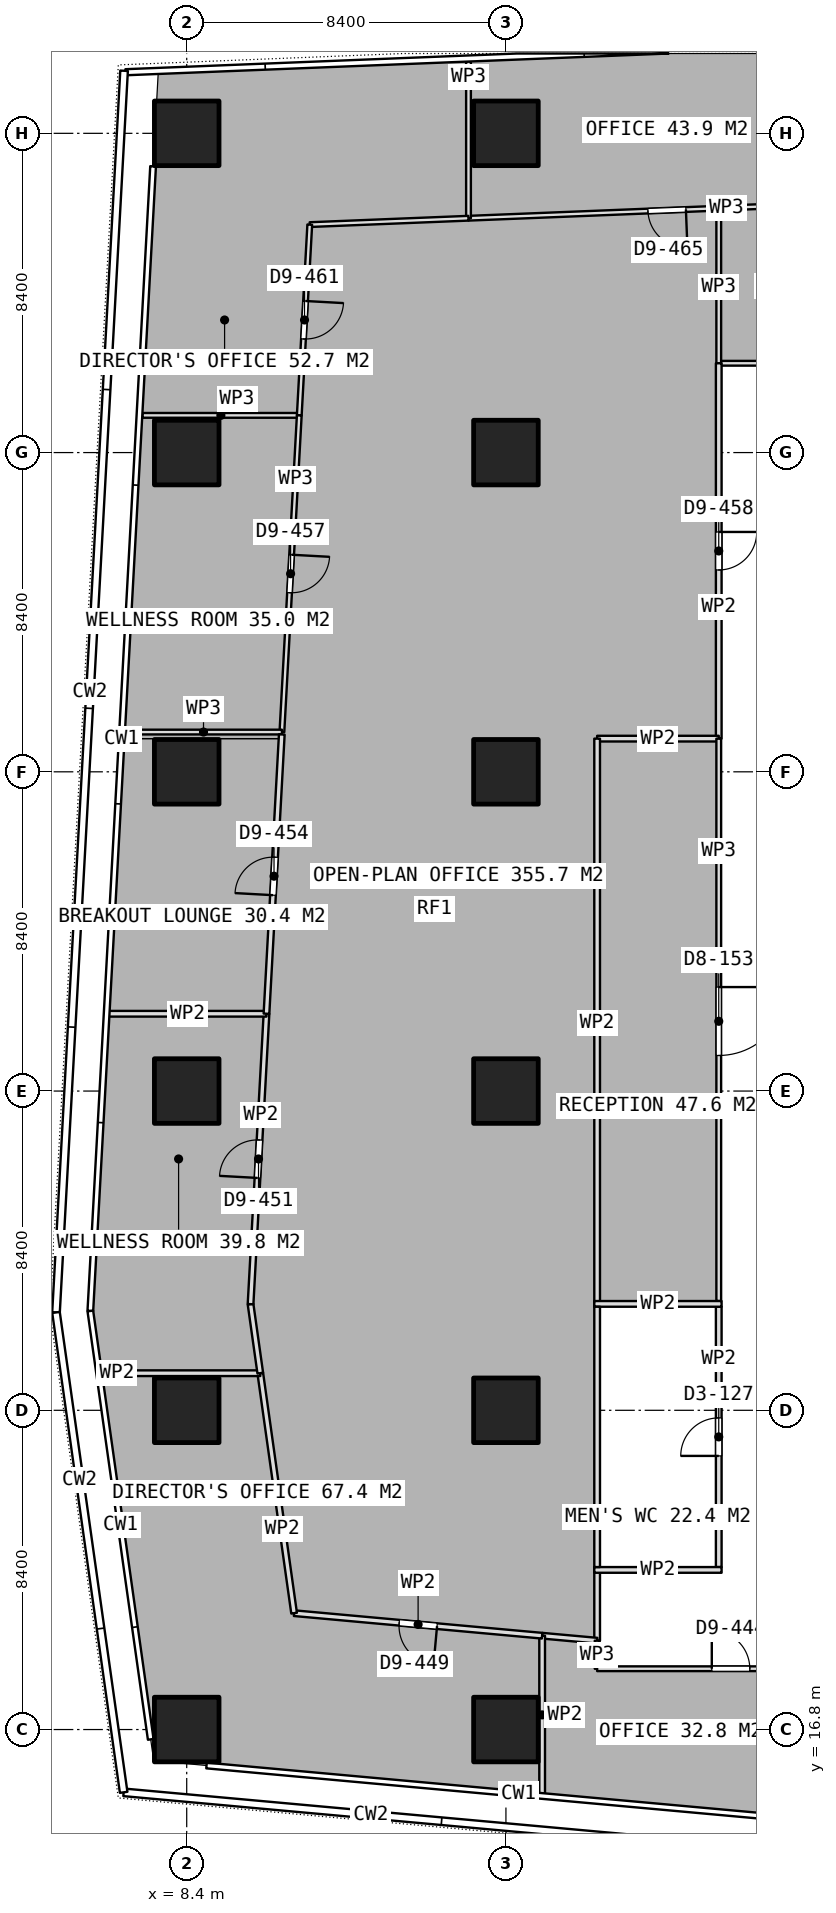
"""IFC4 building model, lengths in metres.
Left out: names, types, materials, properties, quantities, classifications, styles, units other than length and angle.
Written with IfcOpenShell. Run it as: python <this file> out.ifc"""

import sys

from ifc_helpers import new_model, si_unit, direction, frame, frame_2d, origin, origin_2d, place, context, subcontext, project, spatial, rectangle, extrude, element, fill, save


model = new_model("IFC4")
c1 = context("Model", 3, precision=1e-05, world=origin(), true_north=direction((0.0, 1.0)))
c2 = subcontext(c1, "Body", "Model", "MODEL_VIEW")
j1 = project(units=[si_unit("LENGTHUNIT", "METRE"), si_unit("PLANEANGLEUNIT", "RADIAN")], contexts=[c1])
p1 = place(None, origin())
s1 = spatial("IfcSite", under=j1, at=p1, CompositionType="ELEMENT")
p2 = place(p1, origin())
s2 = spatial("IfcBuilding", under=s1, at=p2, CompositionType="ELEMENT")
p3 = place(p2, frame((0.0, 0.0, 121.55)))
s3 = spatial("IfcBuildingStorey", under=s2, at=p3, CompositionType="ELEMENT", Elevation=121.55)
for number, where, z_axis, x_axis in (
    (1, (8.4, 16.8, 0.0), (0.0, 0.0, 1.0), (1.0, 0.0, 0.0)),
    (2, (8.4, 25.2, 0.0), (0.0, 0.0, 1.0), (1.0, 0.0, 0.0)),
    (3, (8.4, 33.6, 0.0), (0.0, 0.0, 1.0), (1.0, 0.0, 0.0)),
    (4, (8.4, 42.0, 0.0), (0.0, 0.0, 1.0), (1.0, 0.0, 0.0)),
    (5, (8.4, 50.4, 0.0), (0.0, 0.0, 1.0), (1.0, 0.0, 0.0)),
    (6, (8.4, 58.8, 0.0), (0.0, 0.0, 1.0), (1.0, 0.0, 0.0)),
    (7, (16.8, 16.8, 0.0), (0.0, 0.0, 1.0), (1.0, 0.0, 0.0)),
    (8, (16.8, 25.2, 0.0), (0.0, 0.0, 1.0), (1.0, 0.0, 0.0)),
    (9, (16.8, 33.6, 0.0), (0.0, 0.0, 1.0), (1.0, 0.0, 0.0)),
    (10, (16.8, 42.0, 0.0), (0.0, 0.0, 1.0), (1.0, 0.0, 0.0)),
    (11, (16.8, 50.4, 0.0), (0.0, 0.0, 1.0), (1.0, 0.0, 0.0)),
    (12, (16.8, 58.8, 0.0), (0.0, 0.0, 1.0), (1.0, 0.0, 0.0)),
):
    element("IfcColumn", number, at=place(p3, frame(where, z_axis=z_axis, x_axis=x_axis)), inside=s3, PredefinedType="COLUMN", context=c2, shape_type="SweptSolid", body=[
        extrude(rectangle(XDim=1.7, YDim=1.7, at=origin_2d()), origin(), (0.0, 0.0, 1.0), 3.75),
    ])
for number, where, z_axis, x_axis in (
    (13, (19.125, 21.0, 0.0), (0.0, 0.0, 1.0), (1.0, 0.0, 0.0)),
    (14, (19.125, 28.0, 0.0), (0.0, 0.0, 1.0), (1.0, 0.0, 0.0)),
):
    element("IfcWall", number, at=place(p3, frame(where, z_axis=z_axis, x_axis=x_axis)), inside=s3, PredefinedType="PARTITIONING", context=c2, shape_type="SweptSolid", body=[
        extrude(rectangle(XDim=3.35, YDim=0.15, at=frame_2d((1.675, 0.0))), origin(), (0.0, 0.0, 1.0), 3.5),
    ])
p4 = place(p3, frame((19.2, 21.075, 0.0), z_axis=(0.0, 0.0, 1.0), x_axis=(0.0, 1.0, 0.0)))
e15 = element("IfcWall", 15, at=p4, inside=s3, PredefinedType="PARTITIONING", context=c2, shape_type="SweptSolid", body=[
    extrude(rectangle(XDim=6.85, YDim=0.15, at=frame_2d((3.425, 0.0))), origin(), (0.0, 0.0, 1.0), 3.5),
])
p5 = place(p3, frame((22.4, 21.075, 0.0), z_axis=(0.0, 0.0, 1.0), x_axis=(0.0, 1.0, 0.0)))
e16 = element("IfcWall", 16, at=p5, inside=s3, PredefinedType="PARTITIONING", context=c2, shape_type="SweptSolid", body=[
    extrude(rectangle(XDim=6.85, YDim=0.15, at=frame_2d((3.425, 0.0))), origin(), (0.0, 0.0, 1.0), 3.5),
])
p6 = place(p5, frame((2.925, 0.0, 0.0)))
e17 = element("IfcOpeningElement", 17, at=p6, cuts=e16, PredefinedType="OPENING", context=c2, shape_type="SweptSolid", body=[
    extrude(rectangle(XDim=1.0, YDim=2.1, at=frame_2d((0.5, 1.05))), frame((0.0, 0.085, 0.0), z_axis=(0.0, -1.0, 0.0), x_axis=(1.0, 0.0, 0.0)), (0.0, 0.0, 1.0), 0.17),
])
p7 = place(p3, frame((26.257, 56.984, 0.0), z_axis=(0.0, 0.0, 1.0), x_axis=(-0.999199876108, -0.039995094524, 0.0)))
e18 = element("IfcWall", 18, at=p7, inside=s3, PredefinedType="PARTITIONING", context=c2, shape_type="SweptSolid", body=[
    extrude(rectangle(XDim=10.45, YDim=0.125, at=frame_2d((5.225, 0.0))), origin(), (0.0, 0.0, 1.0), 3.5),
])
p8 = place(p7, frame((4.725, 0.0, 0.0)))
e19 = element("IfcOpeningElement", 19, at=p8, cuts=e18, PredefinedType="OPENING", context=c2, shape_type="SweptSolid", body=[
    extrude(rectangle(XDim=1.0, YDim=2.1, at=frame_2d((0.5, 1.05))), frame((0.0, 0.073, 0.0), z_axis=(0.0, -1.0, 0.0), x_axis=(1.0, 0.0, 0.0)), (0.0, 0.0, 1.0), 0.145),
])
p9 = place(p3, frame((15.815, 56.566, 0.0), z_axis=(0.0, 0.0, 1.0), x_axis=(0.0, 1.0, 0.0)))
e20 = element("IfcWall", 20, at=p9, inside=s3, PredefinedType="PARTITIONING", context=c2, shape_type="SweptSolid", body=[
    extrude(rectangle(XDim=4.123, YDim=0.125, at=frame_2d((2.062, 0.0))), origin(), (0.0, 0.0, 1.0), 3.5),
])
p10 = place(p3, frame((11.362, 51.379, 0.0), z_axis=(0.0, 0.0, 1.0), x_axis=(-1.0, 0.0, 0.0)))
e21 = element("IfcWall", 21, at=p10, inside=s3, PredefinedType="PARTITIONING", context=c2, shape_type="SweptSolid", body=[
    extrude(rectangle(XDim=4.126, YDim=0.125, at=frame_2d((2.063, 0.0))), origin(), (0.0, 0.0, 1.0), 3.5),
])
p11 = place(p3, frame((15.814, 56.566, 0.0), z_axis=(0.0, 0.0, 1.0), x_axis=(-0.999192069217, -0.040189660545, 0.0)))
e22 = element("IfcWall", 22, at=p11, inside=s3, PredefinedType="PARTITIONING", context=c2, shape_type="SweptSolid", body=[
    extrude(rectangle(XDim=4.179, YDim=0.125, at=frame_2d((2.09, 0.0))), origin(), (0.0, 0.0, 1.0), 3.5),
])
p12 = place(p3, frame((11.638, 56.398, 0.0), z_axis=(0.0, 0.0, 1.0), x_axis=(-0.05488358881, -0.998492759953, 0.0)))
e23 = element("IfcWall", 23, at=p12, inside=s3, PredefinedType="PARTITIONING", context=c2, shape_type="SweptSolid", body=[
    extrude(rectangle(XDim=5.027, YDim=0.125, at=frame_2d((2.513, 0.0))), origin(), (0.0, 0.0, 1.0), 3.5),
])
p13 = place(p12, frame((2.013, 0.0, 0.0)))
e24 = element("IfcOpeningElement", 24, at=p13, cuts=e23, PredefinedType="OPENING", context=c2, shape_type="SweptSolid", body=[
    extrude(rectangle(XDim=1.0, YDim=2.1, at=frame_2d((0.5, 1.05))), frame((0.0, 0.073, 0.0), z_axis=(0.0, -1.0, 0.0), x_axis=(1.0, 0.0, 0.0)), (0.0, 0.0, 1.0), 0.145),
])
p14 = place(p3, frame((11.362, 51.378, 0.0), z_axis=(0.0, 0.0, 1.0), x_axis=(-0.054769987218, -0.998498997746, 0.0)))
e25 = element("IfcWall", 25, at=p14, inside=s3, PredefinedType="PARTITIONING", context=c2, shape_type="SweptSolid", body=[
    extrude(rectangle(XDim=8.344, YDim=0.125, at=frame_2d((4.172, 0.0))), origin(), (0.0, 0.0, 1.0), 3.5),
])
p15 = place(p14, frame((3.672, 0.0, 0.0)))
e26 = element("IfcOpeningElement", 26, at=p15, cuts=e25, PredefinedType="OPENING", context=c2, shape_type="SweptSolid", body=[
    extrude(rectangle(XDim=1.0, YDim=2.1, at=frame_2d((0.5, 1.05))), frame((0.0, 0.073, 0.0), z_axis=(0.0, -1.0, 0.0), x_axis=(1.0, 0.0, 0.0)), (0.0, 0.0, 1.0), 0.145),
])
p16 = place(p3, frame((10.905, 43.046, 0.0), z_axis=(0.0, 0.0, 1.0), x_axis=(-1.0, 0.0, 0.0)))
e27 = element("IfcWall", 27, at=p16, inside=s3, PredefinedType="PARTITIONING", context=c2, shape_type="SweptSolid", body=[
    extrude(rectangle(XDim=4.126, YDim=0.125, at=frame_2d((2.063, 0.0))), origin(), (0.0, 0.0, 1.0), 3.5),
])
p17 = place(p3, frame((29.6, 52.75, 0.0), z_axis=(0.0, 0.0, 1.0), x_axis=(-1.0, 0.0, 0.0)))
e28 = element("IfcWall", 28, at=p17, inside=s3, PredefinedType="PARTITIONING", context=c2, shape_type="SweptSolid", body=[
    extrude(rectangle(XDim=7.2, YDim=0.125, at=frame_2d((3.6, 0.0))), origin(), (0.0, 0.0, 1.0), 3.5),
])
p18 = place(p17, frame((3.1, 0.0, 0.0)))
e29 = element("IfcOpeningElement", 29, at=p18, cuts=e28, PredefinedType="OPENING", context=c2, shape_type="SweptSolid", body=[
    extrude(rectangle(XDim=1.0, YDim=2.1, at=frame_2d((0.5, 1.05))), frame((0.0, 0.073, 0.0), z_axis=(0.0, -1.0, 0.0), x_axis=(1.0, 0.0, 0.0)), (0.0, 0.0, 1.0), 0.145),
])
p19 = place(p3, frame((22.4, 52.75, 0.0), z_axis=(0.0, 0.0, 1.0), x_axis=(0.0, 1.0, 0.0)))
e30 = element("IfcWall", 30, at=p19, inside=s3, PredefinedType="PARTITIONING", context=c2, shape_type="SweptSolid", body=[
    extrude(rectangle(XDim=4.017, YDim=0.125, at=frame_2d((2.009, 0.0))), origin(), (0.0, 0.0, 1.0), 3.5),
])
p20 = place(p3, frame((22.4, 52.75, 0.0), z_axis=(0.0, 0.0, 1.0), x_axis=(0.0, -1.0, 0.0)))
e31 = element("IfcWall", 31, at=p20, inside=s3, PredefinedType="PARTITIONING", context=c2, shape_type="SweptSolid", body=[
    extrude(rectangle(XDim=9.877, YDim=0.15, at=frame_2d((4.938, 0.0))), origin(), (0.0, 0.0, 1.0), 3.5),
])
p21 = place(p20, frame((4.439, 0.0, 0.0)))
e32 = element("IfcOpeningElement", 32, at=p21, cuts=e31, PredefinedType="OPENING", context=c2, shape_type="SweptSolid", body=[
    extrude(rectangle(XDim=1.0, YDim=2.1, at=frame_2d((0.5, 1.05))), frame((0.0, 0.085, 0.0), z_axis=(0.0, -1.0, 0.0), x_axis=(1.0, 0.0, 0.0)), (0.0, 0.0, 1.0), 0.17),
])
p22 = place(p3, frame((22.4, 42.873, 0.0), z_axis=(0.0, 0.0, 1.0), x_axis=(-1.0, 0.0, 0.0)))
e33 = element("IfcWall", 33, at=p22, inside=s3, PredefinedType="PARTITIONING", context=c2, shape_type="SweptSolid", body=[
    extrude(rectangle(XDim=3.2, YDim=0.15, at=frame_2d((1.6, 0.0))), origin(), (0.0, 0.0, 1.0), 3.5),
])
p23 = place(p3, frame((19.2, 42.873, 0.0), z_axis=(0.0, 0.0, 1.0), x_axis=(0.0, -1.0, 0.0)))
e34 = element("IfcWall", 34, at=p23, inside=s3, PredefinedType="PARTITIONING", context=c2, shape_type="SweptSolid", body=[
    extrude(rectangle(XDim=14.948, YDim=0.15, at=frame_2d((7.474, 0.0))), origin(), (0.0, 0.0, 1.0), 3.5),
])
p24 = place(p3, frame((19.2, 21.075, 0.0), z_axis=(0.0, 0.0, 1.0), x_axis=(0.0, -1.0, 0.0)))
e35 = element("IfcWall", 35, at=p24, inside=s3, PredefinedType="PARTITIONING", context=c2, shape_type="SweptSolid", body=[
    extrude(rectangle(XDim=1.937, YDim=0.15, at=frame_2d((0.969, 0.0))), origin(), (0.0, 0.0, 1.0), 3.5),
])
p25 = place(p3, frame((19.2, 19.138, 0.0), z_axis=(0.0, 0.0, 1.0), x_axis=(-0.995920706464, 0.090232734836, 0.0)))
e36 = element("IfcWall", 36, at=p25, inside=s3, PredefinedType="PARTITIONING", context=c2, shape_type="SweptSolid", body=[
    extrude(rectangle(XDim=1.453, YDim=0.15, at=frame_2d((0.727, 0.0))), origin(), (0.0, 0.0, 1.0), 3.5),
])
p26 = place(p3, frame((17.753, 19.269, 0.0), z_axis=(0.0, 0.0, 1.0), x_axis=(0.0, -1.0, 0.0)))
e37 = element("IfcWall", 37, at=p26, inside=s3, PredefinedType="PARTITIONING", context=c2, shape_type="SweptSolid", body=[
    extrude(rectangle(XDim=4.167, YDim=0.15, at=frame_2d((2.083, 0.0))), origin(), (0.0, 0.0, 1.0), 3.5),
])
p27 = place(p3, frame((17.752, 19.269, 0.0), z_axis=(0.0, 0.0, 1.0), x_axis=(-0.995896565077, 0.090498793736, 0.0)))
e38 = element("IfcWall", 38, at=p27, inside=s3, PredefinedType="PARTITIONING", context=c2, shape_type="SweptSolid", body=[
    extrude(rectangle(XDim=6.553, YDim=0.15, at=frame_2d((3.276, 0.0))), origin(), (0.0, 0.0, 1.0), 3.5),
])
p28 = place(p27, frame((2.776, 0.0, 0.0)))
e39 = element("IfcOpeningElement", 39, at=p28, cuts=e38, PredefinedType="OPENING", context=c2, shape_type="SweptSolid", body=[
    extrude(rectangle(XDim=1.0, YDim=2.1, at=frame_2d((0.5, 1.05))), frame((0.0, 0.085, 0.0), z_axis=(0.0, -1.0, 0.0), x_axis=(1.0, 0.0, 0.0)), (0.0, 0.0, 1.0), 0.17),
])
p29 = place(p3, frame((11.226, 19.862, 0.0), z_axis=(0.0, 0.0, 1.0), x_axis=(-0.13959860056, 0.990208175447, 0.0)))
e40 = element("IfcWall", 40, at=p29, inside=s3, PredefinedType="PARTITIONING", context=c2, shape_type="SweptSolid", body=[
    extrude(rectangle(XDim=6.376, YDim=0.15, at=frame_2d((3.188, 0.0))), origin(), (0.0, 0.0, 1.0), 3.5),
])
p30 = place(p3, frame((10.336, 26.176, 0.0), z_axis=(0.0, 0.0, 1.0), x_axis=(-1.0, 0.0, 0.0)))
e41 = element("IfcWall", 41, at=p30, inside=s3, PredefinedType="PARTITIONING", context=c2, shape_type="SweptSolid", body=[
    extrude(rectangle(XDim=4.191, YDim=0.15, at=frame_2d((2.095, 0.0))), origin(), (0.0, 0.0, 1.0), 3.5),
])
p31 = place(p3, frame((10.336, 26.177, 0.0), z_axis=(0.0, 0.0, 1.0), x_axis=(-0.139520002301, 0.990219252973, 0.0)))
e42 = element("IfcWall", 42, at=p31, inside=s3, PredefinedType="PARTITIONING", context=c2, shape_type="SweptSolid", body=[
    extrude(rectangle(XDim=1.834, YDim=0.15, at=frame_2d((0.917, 0.0))), origin(), (0.0, 0.0, 1.0), 3.5),
])
p32 = place(p3, frame((10.08, 27.993, 0.0), z_axis=(0.0, 0.0, 1.0), x_axis=(0.054745561338, 0.998500337263, 0.0)))
e43 = element("IfcWall", 43, at=p32, inside=s3, PredefinedType="PARTITIONING", context=c2, shape_type="SweptSolid", body=[
    extrude(rectangle(XDim=7.653, YDim=0.15, at=frame_2d((3.826, 0.0))), origin(), (0.0, 0.0, 1.0), 3.5),
])
p33 = place(p32, frame((3.326, 0.0, 0.0)))
e44 = element("IfcOpeningElement", 44, at=p33, cuts=e43, PredefinedType="OPENING", context=c2, shape_type="SweptSolid", body=[
    extrude(rectangle(XDim=1.0, YDim=2.1, at=frame_2d((0.5, 1.05))), frame((0.0, 0.085, 0.0), z_axis=(0.0, -1.0, 0.0), x_axis=(1.0, 0.0, 0.0)), (0.0, 0.0, 1.0), 0.17),
])
p34 = place(p3, frame((10.499, 35.634, 0.0), z_axis=(0.0, 0.0, 1.0), x_axis=(-1.0, 0.0, 0.0)))
e45 = element("IfcWall", 45, at=p34, inside=s3, PredefinedType="PARTITIONING", context=c2, shape_type="SweptSolid", body=[
    extrude(rectangle(XDim=4.156, YDim=0.15, at=frame_2d((2.078, 0.0))), origin(), (0.0, 0.0, 1.0), 3.5),
])
p35 = place(p3, frame((10.499, 35.635, 0.0), z_axis=(0.0, 0.0, 1.0), x_axis=(0.054773615864, 0.9984987987, 0.0)))
e46 = element("IfcWall", 46, at=p35, inside=s3, PredefinedType="PARTITIONING", context=c2, shape_type="SweptSolid", body=[
    extrude(rectangle(XDim=7.359, YDim=0.15, at=frame_2d((3.679, 0.0))), origin(), (0.0, 0.0, 1.0), 3.5),
])
p36 = place(p35, frame((3.124, 0.0, 0.0)))
e47 = element("IfcOpeningElement", 47, at=p36, cuts=e46, PredefinedType="OPENING", context=c2, shape_type="SweptSolid", body=[
    extrude(rectangle(XDim=1.0, YDim=2.1, at=frame_2d((0.5, 1.05))), frame((0.0, 0.085, 0.0), z_axis=(0.0, -1.0, 0.0), x_axis=(1.0, 0.0, 0.0)), (0.0, 0.0, 1.0), 0.17),
])
p37 = place(p3, frame((19.2, 19.138, 0.0), z_axis=(0.0, 0.0, 1.0), x_axis=(0.0, -1.0, 0.0)))
e48 = element("IfcWall", 48, at=p37, inside=s3, PredefinedType="PARTITIONING", context=c2, shape_type="SweptSolid", body=[
    extrude(rectangle(XDim=0.738, YDim=0.125, at=frame_2d((0.369, 0.0))), origin(), (0.0, 0.0, 1.0), 3.5),
])
p38 = place(p3, frame((19.2, 18.4, 0.0), z_axis=(0.0, 0.0, 1.0), x_axis=(1.0, 0.0, 0.0)))
e49 = element("IfcWall", 49, at=p38, inside=s3, PredefinedType="PARTITIONING", context=c2, shape_type="SweptSolid", body=[
    extrude(rectangle(XDim=7.034, YDim=0.125, at=frame_2d((3.517, 0.0))), origin(), (0.0, 0.0, 1.0), 3.5),
])
p39 = place(p38, frame((3.017, 0.0, 0.0)))
e50 = element("IfcOpeningElement", 50, at=p39, cuts=e49, PredefinedType="OPENING", context=c2, shape_type="SweptSolid", body=[
    extrude(rectangle(XDim=1.0, YDim=2.1, at=frame_2d((0.5, 1.05))), frame((0.0, 0.073, 0.0), z_axis=(0.0, -1.0, 0.0), x_axis=(1.0, 0.0, 0.0)), (0.0, 0.0, 1.0), 0.145),
])
p40 = place(p3, frame((22.4, 42.872, 0.0), z_axis=(0.0, 0.0, 1.0), x_axis=(0.0, -1.0, 0.0)))
e51 = element("IfcWall", 51, at=p40, inside=s3, PredefinedType="PARTITIONING", context=c2, shape_type="SweptSolid", body=[
    extrude(rectangle(XDim=14.797, YDim=0.125, at=frame_2d((7.398, 0.0))), origin(), (0.0, 0.0, 1.0), 3.5),
])
p41 = place(p40, frame((6.536, 0.0, 0.0)))
e52 = element("IfcOpeningElement", 52, at=p41, cuts=e51, PredefinedType="OPENING", context=c2, shape_type="SweptSolid", body=[
    extrude(rectangle(XDim=1.8, YDim=2.1, at=frame_2d((0.9, 1.05))), frame((0.0, 0.073, 0.0), z_axis=(0.0, -1.0, 0.0), x_axis=(1.0, 0.0, 0.0)), (0.0, 0.0, 1.0), 0.145),
])
p42 = place(p6, origin())
e53 = element("IfcDoor", 53, at=p42, inside=s3, OperationType="SINGLE_SWING_LEFT", PredefinedType="DOOR", context=c2, shape_type="SweptSolid", body=[
    extrude(rectangle(XDim=1.0, YDim=2.1, at=frame_2d((0.5, 1.05))), frame((0.0, 0.025, 0.0), z_axis=(0.0, -1.0, 0.0), x_axis=(1.0, 0.0, 0.0)), (0.0, 0.0, 1.0), 0.05),
])
fill(e17, e53)
p43 = place(p8, origin())
e54 = element("IfcDoor", 54, at=p43, inside=s3, OperationType="SINGLE_SWING_LEFT", PredefinedType="DOOR", context=c2, shape_type="SweptSolid", body=[
    extrude(rectangle(XDim=1.0, YDim=2.1, at=frame_2d((0.5, 1.05))), frame((0.0, 0.025, 0.0), z_axis=(0.0, -1.0, 0.0), x_axis=(1.0, 0.0, 0.0)), (0.0, 0.0, 1.0), 0.05),
])
fill(e19, e54)
p44 = place(p13, origin())
e55 = element("IfcDoor", 55, at=p44, inside=s3, OperationType="SINGLE_SWING_LEFT", PredefinedType="DOOR", context=c2, shape_type="SweptSolid", body=[
    extrude(rectangle(XDim=1.0, YDim=2.1, at=frame_2d((0.5, 1.05))), frame((0.0, 0.025, 0.0), z_axis=(0.0, -1.0, 0.0), x_axis=(1.0, 0.0, 0.0)), (0.0, 0.0, 1.0), 0.05),
])
fill(e24, e55)
p45 = place(p15, origin())
e56 = element("IfcDoor", 56, at=p45, inside=s3, OperationType="SINGLE_SWING_LEFT", PredefinedType="DOOR", context=c2, shape_type="SweptSolid", body=[
    extrude(rectangle(XDim=1.0, YDim=2.1, at=frame_2d((0.5, 1.05))), frame((0.0, 0.025, 0.0), z_axis=(0.0, -1.0, 0.0), x_axis=(1.0, 0.0, 0.0)), (0.0, 0.0, 1.0), 0.05),
])
fill(e26, e56)
p46 = place(p21, origin())
e57 = element("IfcDoor", 57, at=p46, inside=s3, OperationType="SINGLE_SWING_LEFT", PredefinedType="DOOR", context=c2, shape_type="SweptSolid", body=[
    extrude(rectangle(XDim=1.0, YDim=2.1, at=frame_2d((0.5, 1.05))), frame((0.0, 0.025, 0.0), z_axis=(0.0, -1.0, 0.0), x_axis=(1.0, 0.0, 0.0)), (0.0, 0.0, 1.0), 0.05),
])
fill(e32, e57)
p47 = place(p36, origin())
e58 = element("IfcDoor", 58, at=p47, inside=s3, OperationType="SINGLE_SWING_LEFT", PredefinedType="DOOR", context=c2, shape_type="SweptSolid", body=[
    extrude(rectangle(XDim=1.0, YDim=2.1, at=frame_2d((0.5, 1.05))), frame((0.0, 0.025, 0.0), z_axis=(0.0, -1.0, 0.0), x_axis=(1.0, 0.0, 0.0)), (0.0, 0.0, 1.0), 0.05),
])
fill(e47, e58)
p48 = place(p33, origin())
e59 = element("IfcDoor", 59, at=p48, inside=s3, OperationType="SINGLE_SWING_LEFT", PredefinedType="DOOR", context=c2, shape_type="SweptSolid", body=[
    extrude(rectangle(XDim=1.0, YDim=2.1, at=frame_2d((0.5, 1.05))), frame((0.0, 0.025, 0.0), z_axis=(0.0, -1.0, 0.0), x_axis=(1.0, 0.0, 0.0)), (0.0, 0.0, 1.0), 0.05),
])
fill(e44, e59)
p49 = place(p28, origin())
e60 = element("IfcDoor", 60, at=p49, inside=s3, OperationType="SINGLE_SWING_LEFT", PredefinedType="DOOR", context=c2, shape_type="SweptSolid", body=[
    extrude(rectangle(XDim=1.0, YDim=2.1, at=frame_2d((0.5, 1.05))), frame((0.0, 0.025, 0.0), z_axis=(0.0, -1.0, 0.0), x_axis=(1.0, 0.0, 0.0)), (0.0, 0.0, 1.0), 0.05),
])
fill(e39, e60)
p50 = place(p39, origin())
e61 = element("IfcDoor", 61, at=p50, inside=s3, OperationType="SINGLE_SWING_LEFT", PredefinedType="DOOR", context=c2, shape_type="SweptSolid", body=[
    extrude(rectangle(XDim=1.0, YDim=2.1, at=frame_2d((0.5, 1.05))), frame((0.0, 0.025, 0.0), z_axis=(0.0, -1.0, 0.0), x_axis=(1.0, 0.0, 0.0)), (0.0, 0.0, 1.0), 0.05),
])
fill(e50, e61)
p51 = place(p41, origin())
e62 = element("IfcDoor", 62, at=p51, inside=s3, OperationType="DOUBLE_DOOR_SINGLE_SWING", PredefinedType="DOOR", context=c2, shape_type="SweptSolid", body=[
    extrude(rectangle(XDim=1.8, YDim=2.1, at=frame_2d((0.9, 1.05))), frame((0.0, 0.025, 0.0), z_axis=(0.0, -1.0, 0.0), x_axis=(1.0, 0.0, 0.0)), (0.0, 0.0, 1.0), 0.05),
])
fill(e52, e62)
save(model, sys.argv[1])
